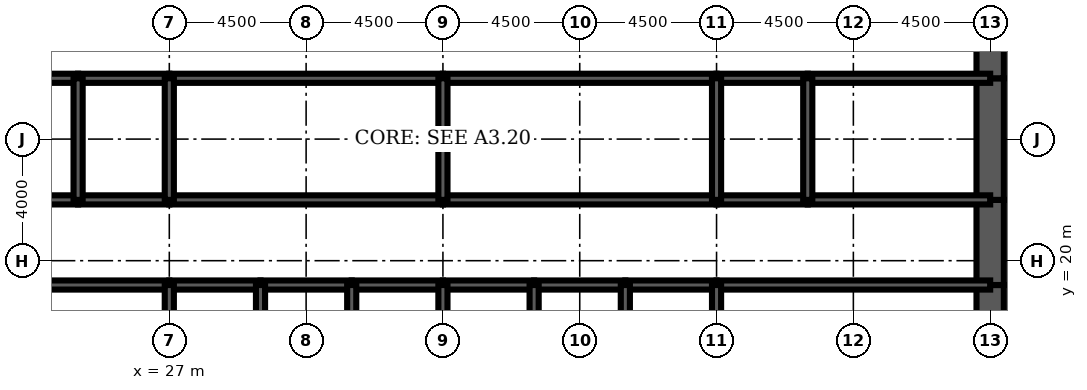
"""IFC4 building model, lengths in metres.
Left out: names, types, materials, properties, quantities, classifications, styles, units other than length and angle.
Written with IfcOpenShell. Run it as: python <this file> out.ifc"""

import sys

from ifc_helpers import new_model, si_unit, direction, frame, frame_2d, origin, place, context, subcontext, project, spatial, rectangle, extrude, element, fill, save


model = new_model("IFC4")
c1 = context("Model", 3, precision=1e-05, world=origin(), true_north=direction((0.0, 1.0)))
c2 = subcontext(c1, "Body", "Model", "MODEL_VIEW")
j1 = project(units=[si_unit("LENGTHUNIT", "METRE"), si_unit("PLANEANGLEUNIT", "RADIAN")], contexts=[c1])
p1 = place(None, origin())
s1 = spatial("IfcSite", under=j1, at=p1, CompositionType="ELEMENT")
p2 = place(p1, origin())
s2 = spatial("IfcBuilding", under=s1, at=p2, CompositionType="ELEMENT")
p3 = place(p2, frame((0.0, 0.0, 86.0)))
s3 = spatial("IfcBuildingStorey", under=s2, at=p3, CompositionType="ELEMENT", Elevation=86.0)
p4 = place(p3, frame((54.0, 16.0, 0.0), z_axis=(0.0, 0.0, 1.0), x_axis=(0.0, 1.0, 0.0)))
e1 = element("IfcWall", 1, at=p4, inside=s3, PredefinedType="SHEAR", context=c2, shape_type="SweptSolid", body=[
    extrude(rectangle(XDim=3.2, YDim=0.9, at=frame_2d((1.6, 0.0))), origin(), (0.0, 0.0, 1.0), 4.5),
])
p5 = place(p3, frame((54.0, 19.2, 0.0), z_axis=(0.0, 0.0, 1.0), x_axis=(0.0, 1.0, 0.0)))
e2 = element("IfcWall", 2, at=p5, inside=s3, PredefinedType="SHEAR", context=c2, shape_type="SweptSolid", body=[
    extrude(rectangle(XDim=2.8, YDim=0.9, at=frame_2d((1.4, 0.0))), origin(), (0.0, 0.0, 1.0), 4.5),
])
p6 = place(p5, frame((0.4, 0.0, 0.0)))
e3 = element("IfcOpeningElement", 3, at=p6, cuts=e2, PredefinedType="OPENING", context=c2, shape_type="SweptSolid", body=[
    extrude(rectangle(XDim=1.8, YDim=2.1, at=frame_2d((0.9, 1.05))), frame((0.0, 0.46, 0.0), z_axis=(0.0, -1.0, 0.0), x_axis=(1.0, 0.0, 0.0)), (0.0, 0.0, 1.0), 0.92),
])
p7 = place(p3, frame((54.0, 22.0, 0.0), z_axis=(0.0, 0.0, 1.0), x_axis=(0.0, 1.0, 0.0)))
e4 = element("IfcWall", 4, at=p7, inside=s3, PredefinedType="SHEAR", context=c2, shape_type="SweptSolid", body=[
    extrude(rectangle(XDim=4.0, YDim=0.9, at=frame_2d((2.0, 0.0))), origin(), (0.0, 0.0, 1.0), 4.5),
])
p8 = place(p3, frame((54.0, 26.0, 0.0), z_axis=(0.0, 0.0, 1.0), x_axis=(0.0, 1.0, 0.0)))
e5 = element("IfcWall", 5, at=p8, inside=s3, PredefinedType="SHEAR", context=c2, shape_type="SweptSolid", body=[
    extrude(rectangle(XDim=2.8, YDim=0.9, at=frame_2d((1.4, 0.0))), origin(), (0.0, 0.0, 1.0), 4.5),
])
p9 = place(p8, frame((0.6, 0.0, 0.0)))
e6 = element("IfcOpeningElement", 6, at=p9, cuts=e5, PredefinedType="OPENING", context=c2, shape_type="SweptSolid", body=[
    extrude(rectangle(XDim=1.8, YDim=2.1, at=frame_2d((0.9, 1.05))), frame((0.0, 0.46, 0.0), z_axis=(0.0, -1.0, 0.0), x_axis=(1.0, 0.0, 0.0)), (0.0, 0.0, 1.0), 0.92),
])
p10 = place(p3, frame((18.0, 19.2, 0.0), z_axis=(0.0, 0.0, 1.0), x_axis=(1.0, 0.0, 0.0)))
e7 = element("IfcWall", 7, at=p10, inside=s3, PredefinedType="SOLIDWALL", context=c2, shape_type="SweptSolid", body=[
    extrude(rectangle(XDim=9.0, YDim=0.3, at=frame_2d((4.5, 0.0))), origin(), (0.0, 0.0, 1.0), 4.5),
])
p11 = place(p10, frame((0.65, 0.0, 0.0)))
e8 = element("IfcOpeningElement", 8, at=p11, cuts=e7, PredefinedType="OPENING", context=c2, shape_type="SweptSolid", body=[
    extrude(rectangle(XDim=1.0, YDim=2.1, at=frame_2d((0.5, 1.05))), frame((0.0, 0.16, 0.0), z_axis=(0.0, -1.0, 0.0), x_axis=(1.0, 0.0, 0.0)), (0.0, 0.0, 1.0), 0.32),
])
p12 = place(p3, frame((27.0, 19.2, 0.0), z_axis=(0.0, 0.0, 1.0), x_axis=(1.0, 0.0, 0.0)))
e9 = element("IfcWall", 9, at=p12, inside=s3, PredefinedType="SOLIDWALL", context=c2, shape_type="SweptSolid", body=[
    extrude(rectangle(XDim=3.0, YDim=0.3, at=frame_2d((1.5, 0.0))), origin(), (0.0, 0.0, 1.0), 4.5),
])
p13 = place(p12, frame((0.95, 0.0, 0.0)))
e10 = element("IfcOpeningElement", 10, at=p13, cuts=e9, PredefinedType="OPENING", context=c2, shape_type="SweptSolid", body=[
    extrude(rectangle(XDim=1.1, YDim=2.2, at=frame_2d((0.55, 1.1))), frame((0.0, 0.16, 0.0), z_axis=(0.0, -1.0, 0.0), x_axis=(1.0, 0.0, 0.0)), (0.0, 0.0, 1.0), 0.32),
])
p14 = place(p3, frame((30.0, 19.2, 0.0), z_axis=(0.0, 0.0, 1.0), x_axis=(1.0, 0.0, 0.0)))
e11 = element("IfcWall", 11, at=p14, inside=s3, PredefinedType="SOLIDWALL", context=c2, shape_type="SweptSolid", body=[
    extrude(rectangle(XDim=3.0, YDim=0.3, at=frame_2d((1.5, 0.0))), origin(), (0.0, 0.0, 1.0), 4.5),
])
p15 = place(p14, frame((0.95, 0.0, 0.0)))
e12 = element("IfcOpeningElement", 12, at=p15, cuts=e11, PredefinedType="OPENING", context=c2, shape_type="SweptSolid", body=[
    extrude(rectangle(XDim=1.1, YDim=2.2, at=frame_2d((0.55, 1.1))), frame((0.0, 0.16, 0.0), z_axis=(0.0, -1.0, 0.0), x_axis=(1.0, 0.0, 0.0)), (0.0, 0.0, 1.0), 0.32),
])
p16 = place(p3, frame((33.0, 19.2, 0.0), z_axis=(0.0, 0.0, 1.0), x_axis=(1.0, 0.0, 0.0)))
e13 = element("IfcWall", 13, at=p16, inside=s3, PredefinedType="SOLIDWALL", context=c2, shape_type="SweptSolid", body=[
    extrude(rectangle(XDim=3.0, YDim=0.3, at=frame_2d((1.5, 0.0))), origin(), (0.0, 0.0, 1.0), 4.5),
])
p17 = place(p16, frame((0.95, 0.0, 0.0)))
e14 = element("IfcOpeningElement", 14, at=p17, cuts=e13, PredefinedType="OPENING", context=c2, shape_type="SweptSolid", body=[
    extrude(rectangle(XDim=1.1, YDim=2.2, at=frame_2d((0.55, 1.1))), frame((0.0, 0.16, 0.0), z_axis=(0.0, -1.0, 0.0), x_axis=(1.0, 0.0, 0.0)), (0.0, 0.0, 1.0), 0.32),
])
p18 = place(p3, frame((36.0, 19.2, 0.0), z_axis=(0.0, 0.0, 1.0), x_axis=(1.0, 0.0, 0.0)))
e15 = element("IfcWall", 15, at=p18, inside=s3, PredefinedType="SOLIDWALL", context=c2, shape_type="SweptSolid", body=[
    extrude(rectangle(XDim=3.0, YDim=0.3, at=frame_2d((1.5, 0.0))), origin(), (0.0, 0.0, 1.0), 4.5),
])
p19 = place(p18, frame((0.95, 0.0, 0.0)))
e16 = element("IfcOpeningElement", 16, at=p19, cuts=e15, PredefinedType="OPENING", context=c2, shape_type="SweptSolid", body=[
    extrude(rectangle(XDim=1.1, YDim=2.2, at=frame_2d((0.55, 1.1))), frame((0.0, 0.16, 0.0), z_axis=(0.0, -1.0, 0.0), x_axis=(1.0, 0.0, 0.0)), (0.0, 0.0, 1.0), 0.32),
])
for number, where, z_axis, x_axis in (
    (17, (39.0, 19.2, 0.0), (0.0, 0.0, 1.0), (1.0, 0.0, 0.0)),
    (18, (42.0, 19.2, 0.0), (0.0, 0.0, 1.0), (1.0, 0.0, 0.0)),
):
    element("IfcWall", number, at=place(p3, frame(where, z_axis=z_axis, x_axis=x_axis)), inside=s3, PredefinedType="SOLIDWALL", context=c2, shape_type="SweptSolid", body=[
        extrude(rectangle(XDim=3.0, YDim=0.3, at=frame_2d((1.5, 0.0))), origin(), (0.0, 0.0, 1.0), 4.5),
    ])
p20 = place(p3, frame((45.0, 19.2, 0.0), z_axis=(0.0, 0.0, 1.0), x_axis=(1.0, 0.0, 0.0)))
e19 = element("IfcWall", 19, at=p20, inside=s3, PredefinedType="SOLIDWALL", context=c2, shape_type="SweptSolid", body=[
    extrude(rectangle(XDim=9.0, YDim=0.3, at=frame_2d((4.5, 0.0))), origin(), (0.0, 0.0, 1.0), 4.5),
])
p21 = place(p20, frame((7.35, 0.0, 0.0)))
e20 = element("IfcOpeningElement", 20, at=p21, cuts=e19, PredefinedType="OPENING", context=c2, shape_type="SweptSolid", body=[
    extrude(rectangle(XDim=1.0, YDim=2.1, at=frame_2d((0.5, 1.05))), frame((0.0, 0.16, 0.0), z_axis=(0.0, -1.0, 0.0), x_axis=(1.0, 0.0, 0.0)), (0.0, 0.0, 1.0), 0.32),
])
p22 = place(p3, frame((18.0, 22.0, 0.0), z_axis=(0.0, 0.0, 1.0), x_axis=(1.0, 0.0, 0.0)))
e21 = element("IfcWall", 21, at=p22, inside=s3, PredefinedType="SOLIDWALL", context=c2, shape_type="SweptSolid", body=[
    extrude(rectangle(XDim=6.0, YDim=0.3, at=frame_2d((3.0, 0.0))), origin(), (0.0, 0.0, 1.0), 4.5),
])
p23 = place(p22, frame((4.4, 0.0, 0.0)))
e22 = element("IfcOpeningElement", 22, at=p23, cuts=e21, PredefinedType="OPENING", context=c2, shape_type="SweptSolid", body=[
    extrude(rectangle(XDim=1.0, YDim=2.1, at=frame_2d((0.5, 1.05))), frame((0.0, 0.16, 0.0), z_axis=(0.0, -1.0, 0.0), x_axis=(1.0, 0.0, 0.0)), (0.0, 0.0, 1.0), 0.32),
])
p24 = place(p22, frame((0.85, 0.0, 0.0)))
e23 = element("IfcOpeningElement", 23, at=p24, cuts=e21, PredefinedType="OPENING", context=c2, shape_type="SweptSolid", body=[
    extrude(rectangle(XDim=1.0, YDim=2.1, at=frame_2d((0.5, 1.05))), frame((0.0, 0.16, 0.0), z_axis=(0.0, -1.0, 0.0), x_axis=(1.0, 0.0, 0.0)), (0.0, 0.0, 1.0), 0.32),
])
p25 = place(p3, frame((24.0, 22.0, 0.0), z_axis=(0.0, 0.0, 1.0), x_axis=(1.0, 0.0, 0.0)))
e24 = element("IfcWall", 24, at=p25, inside=s3, PredefinedType="SOLIDWALL", context=c2, shape_type="SweptSolid", body=[
    extrude(rectangle(XDim=3.0, YDim=0.3, at=frame_2d((1.5, 0.0))), origin(), (0.0, 0.0, 1.0), 4.5),
])
p26 = place(p25, frame((1.0, 0.0, 0.0)))
e25 = element("IfcOpeningElement", 25, at=p26, cuts=e24, PredefinedType="OPENING", context=c2, shape_type="SweptSolid", body=[
    extrude(rectangle(XDim=1.0, YDim=2.1, at=frame_2d((0.5, 1.05))), frame((0.0, 0.16, 0.0), z_axis=(0.0, -1.0, 0.0), x_axis=(1.0, 0.0, 0.0)), (0.0, 0.0, 1.0), 0.32),
])
p27 = place(p3, frame((27.0, 22.0, 0.0), z_axis=(0.0, 0.0, 1.0), x_axis=(1.0, 0.0, 0.0)))
e26 = element("IfcWall", 26, at=p27, inside=s3, PredefinedType="SOLIDWALL", context=c2, shape_type="SweptSolid", body=[
    extrude(rectangle(XDim=9.0, YDim=0.3, at=frame_2d((4.5, 0.0))), origin(), (0.0, 0.0, 1.0), 4.5),
])
p28 = place(p27, frame((4.0, 0.0, 0.0)))
e27 = element("IfcOpeningElement", 27, at=p28, cuts=e26, PredefinedType="OPENING", context=c2, shape_type="SweptSolid", body=[
    extrude(rectangle(XDim=1.0, YDim=2.1, at=frame_2d((0.5, 1.05))), frame((0.0, 0.16, 0.0), z_axis=(0.0, -1.0, 0.0), x_axis=(1.0, 0.0, 0.0)), (0.0, 0.0, 1.0), 0.32),
])
p29 = place(p3, frame((36.0, 22.0, 0.0), z_axis=(0.0, 0.0, 1.0), x_axis=(1.0, 0.0, 0.0)))
e28 = element("IfcWall", 28, at=p29, inside=s3, PredefinedType="SOLIDWALL", context=c2, shape_type="SweptSolid", body=[
    extrude(rectangle(XDim=9.0, YDim=0.3, at=frame_2d((4.5, 0.0))), origin(), (0.0, 0.0, 1.0), 4.5),
])
p30 = place(p29, frame((4.0, 0.0, 0.0)))
e29 = element("IfcOpeningElement", 29, at=p30, cuts=e28, PredefinedType="OPENING", context=c2, shape_type="SweptSolid", body=[
    extrude(rectangle(XDim=1.0, YDim=2.1, at=frame_2d((0.5, 1.05))), frame((0.0, 0.16, 0.0), z_axis=(0.0, -1.0, 0.0), x_axis=(1.0, 0.0, 0.0)), (0.0, 0.0, 1.0), 0.32),
])
p31 = place(p3, frame((45.0, 22.0, 0.0), z_axis=(0.0, 0.0, 1.0), x_axis=(1.0, 0.0, 0.0)))
e30 = element("IfcWall", 30, at=p31, inside=s3, PredefinedType="SOLIDWALL", context=c2, shape_type="SweptSolid", body=[
    extrude(rectangle(XDim=3.0, YDim=0.3, at=frame_2d((1.5, 0.0))), origin(), (0.0, 0.0, 1.0), 4.5),
])
p32 = place(p31, frame((1.0, 0.0, 0.0)))
e31 = element("IfcOpeningElement", 31, at=p32, cuts=e30, PredefinedType="OPENING", context=c2, shape_type="SweptSolid", body=[
    extrude(rectangle(XDim=1.0, YDim=2.1, at=frame_2d((0.5, 1.05))), frame((0.0, 0.16, 0.0), z_axis=(0.0, -1.0, 0.0), x_axis=(1.0, 0.0, 0.0)), (0.0, 0.0, 1.0), 0.32),
])
p33 = place(p3, frame((48.0, 22.0, 0.0), z_axis=(0.0, 0.0, 1.0), x_axis=(1.0, 0.0, 0.0)))
e32 = element("IfcWall", 32, at=p33, inside=s3, PredefinedType="SOLIDWALL", context=c2, shape_type="SweptSolid", body=[
    extrude(rectangle(XDim=6.0, YDim=0.3, at=frame_2d((3.0, 0.0))), origin(), (0.0, 0.0, 1.0), 4.5),
])
p34 = place(p33, frame((2.0, 0.0, 0.0)))
e33 = element("IfcOpeningElement", 33, at=p34, cuts=e32, PredefinedType="OPENING", context=c2, shape_type="SweptSolid", body=[
    extrude(rectangle(XDim=1.0, YDim=2.1, at=frame_2d((0.5, 1.05))), frame((0.0, 0.16, 0.0), z_axis=(0.0, -1.0, 0.0), x_axis=(1.0, 0.0, 0.0)), (0.0, 0.0, 1.0), 0.32),
])
p35 = place(p33, frame((4.0, 0.0, 0.0)))
e34 = element("IfcOpeningElement", 34, at=p35, cuts=e32, PredefinedType="OPENING", context=c2, shape_type="SweptSolid", body=[
    extrude(rectangle(XDim=1.0, YDim=2.1, at=frame_2d((0.5, 1.05))), frame((0.0, 0.16, 0.0), z_axis=(0.0, -1.0, 0.0), x_axis=(1.0, 0.0, 0.0)), (0.0, 0.0, 1.0), 0.32),
])
p36 = place(p3, frame((18.0, 26.0, 0.0), z_axis=(0.0, 0.0, 1.0), x_axis=(1.0, 0.0, 0.0)))
e35 = element("IfcWall", 35, at=p36, inside=s3, PredefinedType="SOLIDWALL", context=c2, shape_type="SweptSolid", body=[
    extrude(rectangle(XDim=6.0, YDim=0.3, at=frame_2d((3.0, 0.0))), origin(), (0.0, 0.0, 1.0), 4.5),
])
p37 = place(p3, frame((24.0, 26.0, 0.0), z_axis=(0.0, 0.0, 1.0), x_axis=(1.0, 0.0, 0.0)))
e36 = element("IfcWall", 36, at=p37, inside=s3, PredefinedType="SOLIDWALL", context=c2, shape_type="SweptSolid", body=[
    extrude(rectangle(XDim=3.0, YDim=0.3, at=frame_2d((1.5, 0.0))), origin(), (0.0, 0.0, 1.0), 4.5),
])
for number, where, z_axis, x_axis in (
    (37, (27.0, 26.0, 0.0), (0.0, 0.0, 1.0), (1.0, 0.0, 0.0)),
    (38, (36.0, 26.0, 0.0), (0.0, 0.0, 1.0), (1.0, 0.0, 0.0)),
):
    element("IfcWall", number, at=place(p3, frame(where, z_axis=z_axis, x_axis=x_axis)), inside=s3, PredefinedType="SOLIDWALL", context=c2, shape_type="SweptSolid", body=[
        extrude(rectangle(XDim=9.0, YDim=0.3, at=frame_2d((4.5, 0.0))), origin(), (0.0, 0.0, 1.0), 4.5),
    ])
p38 = place(p3, frame((45.0, 26.0, 0.0), z_axis=(0.0, 0.0, 1.0), x_axis=(1.0, 0.0, 0.0)))
e39 = element("IfcWall", 39, at=p38, inside=s3, PredefinedType="SOLIDWALL", context=c2, shape_type="SweptSolid", body=[
    extrude(rectangle(XDim=3.0, YDim=0.3, at=frame_2d((1.5, 0.0))), origin(), (0.0, 0.0, 1.0), 4.5),
])
p39 = place(p3, frame((48.0, 26.0, 0.0), z_axis=(0.0, 0.0, 1.0), x_axis=(1.0, 0.0, 0.0)))
e40 = element("IfcWall", 40, at=p39, inside=s3, PredefinedType="SOLIDWALL", context=c2, shape_type="SweptSolid", body=[
    extrude(rectangle(XDim=6.0, YDim=0.3, at=frame_2d((3.0, 0.0))), origin(), (0.0, 0.0, 1.0), 4.5),
])
for number, where, z_axis, x_axis in (
    (41, (27.0, 16.0, 0.0), (0.0, 0.0, 1.0), (0.0, 1.0, 0.0)),
    (42, (30.0, 16.0, 0.0), (0.0, 0.0, 1.0), (0.0, 1.0, 0.0)),
    (43, (33.0, 16.0, 0.0), (0.0, 0.0, 1.0), (0.0, 1.0, 0.0)),
    (44, (36.0, 16.0, 0.0), (0.0, 0.0, 1.0), (0.0, 1.0, 0.0)),
    (45, (39.0, 16.0, 0.0), (0.0, 0.0, 1.0), (0.0, 1.0, 0.0)),
    (46, (42.0, 16.0, 0.0), (0.0, 0.0, 1.0), (0.0, 1.0, 0.0)),
    (47, (45.0, 16.0, 0.0), (0.0, 0.0, 1.0), (0.0, 1.0, 0.0)),
):
    element("IfcWall", number, at=place(p3, frame(where, z_axis=z_axis, x_axis=x_axis)), inside=s3, PredefinedType="SOLIDWALL", context=c2, shape_type="SweptSolid", body=[
        extrude(rectangle(XDim=3.2, YDim=0.3, at=frame_2d((1.6, 0.0))), origin(), (0.0, 0.0, 1.0), 4.5),
    ])
for number, where, z_axis, x_axis in (
    (48, (24.0, 22.0, 0.0), (0.0, 0.0, 1.0), (0.0, 1.0, 0.0)),
    (49, (27.0, 22.0, 0.0), (0.0, 0.0, 1.0), (0.0, 1.0, 0.0)),
    (50, (36.0, 22.0, 0.0), (0.0, 0.0, 1.0), (0.0, 1.0, 0.0)),
    (51, (45.0, 22.0, 0.0), (0.0, 0.0, 1.0), (0.0, 1.0, 0.0)),
    (52, (48.0, 22.0, 0.0), (0.0, 0.0, 1.0), (0.0, 1.0, 0.0)),
):
    element("IfcWall", number, at=place(p3, frame(where, z_axis=z_axis, x_axis=x_axis)), inside=s3, PredefinedType="SOLIDWALL", context=c2, shape_type="SweptSolid", body=[
        extrude(rectangle(XDim=4.0, YDim=0.3, at=frame_2d((2.0, 0.0))), origin(), (0.0, 0.0, 1.0), 4.5),
    ])
p40 = place(p3, frame((39.0, 22.15, 0.0), z_axis=(0.0, 0.0, 1.0), x_axis=(0.0, 1.0, 0.0)))
e53 = element("IfcWall", 53, at=p40, inside=s3, PredefinedType="PARTITIONING", context=c2, shape_type="SweptSolid", body=[
    extrude(rectangle(XDim=3.7, YDim=0.15, at=frame_2d((1.85, 0.0))), origin(), (0.0, 0.0, 1.0), 3.0),
])
p41 = place(p40, frame((2.2, 0.0, 0.0)))
e54 = element("IfcOpeningElement", 54, at=p41, cuts=e53, PredefinedType="OPENING", context=c2, shape_type="SweptSolid", body=[
    extrude(rectangle(XDim=1.0, YDim=2.1, at=frame_2d((0.5, 1.05))), frame((0.0, 0.085, 0.0), z_axis=(0.0, -1.0, 0.0), x_axis=(1.0, 0.0, 0.0)), (0.0, 0.0, 1.0), 0.17),
])
p42 = place(p3, frame((51.375, 22.15, 0.0), z_axis=(0.0, 0.0, 1.0), x_axis=(0.0, 1.0, 0.0)))
e55 = element("IfcWall", 55, at=p42, inside=s3, PredefinedType="PARTITIONING", context=c2, shape_type="SweptSolid", body=[
    extrude(rectangle(XDim=3.7, YDim=0.15, at=frame_2d((1.85, 0.0))), origin(), (0.0, 0.0, 1.0), 3.0),
])
p43 = place(p3, frame((48.6, 19.35, 0.0), z_axis=(0.0, 0.0, 1.0), x_axis=(0.0, 1.0, 0.0)))
e56 = element("IfcWall", 56, at=p43, inside=s3, PredefinedType="PARTITIONING", context=c2, shape_type="SweptSolid", body=[
    extrude(rectangle(XDim=2.5, YDim=0.15, at=frame_2d((1.25, 0.0))), origin(), (0.0, 0.0, 1.0), 3.0),
])
p44 = place(p43, frame((1.15, 0.0, 0.0)))
e57 = element("IfcOpeningElement", 57, at=p44, cuts=e56, PredefinedType="OPENING", context=c2, shape_type="SweptSolid", body=[
    extrude(rectangle(XDim=1.0, YDim=2.1, at=frame_2d((0.5, 1.05))), frame((0.0, 0.085, 0.0), z_axis=(0.0, -1.0, 0.0), x_axis=(1.0, 0.0, 0.0)), (0.0, 0.0, 1.0), 0.17),
])
p45 = place(p41, origin())
e58 = element("IfcDoor", 58, at=p45, inside=s3, OperationType="SINGLE_SWING_RIGHT", PredefinedType="DOOR", context=c2, shape_type="SweptSolid", body=[
    extrude(rectangle(XDim=1.0, YDim=2.1, at=frame_2d((0.5, 1.05))), frame((0.0, 0.025, 0.0), z_axis=(0.0, -1.0, 0.0), x_axis=(1.0, 0.0, 0.0)), (0.0, 0.0, 1.0), 0.05),
])
fill(e54, e58)
p46 = place(p44, origin())
e59 = element("IfcDoor", 59, at=p46, inside=s3, OperationType="SINGLE_SWING_RIGHT", PredefinedType="DOOR", context=c2, shape_type="SweptSolid", body=[
    extrude(rectangle(XDim=1.0, YDim=2.1, at=frame_2d((0.5, 1.05))), frame((0.0, 0.025, 0.0), z_axis=(0.0, -1.0, 0.0), x_axis=(1.0, 0.0, 0.0)), (0.0, 0.0, 1.0), 0.05),
])
fill(e57, e59)
p47 = place(p13, origin())
e60 = element("IfcDoor", 60, at=p47, inside=s3, OperationType="DOUBLE_DOOR_SLIDING", PredefinedType="USERDEFINED", context=c2, shape_type="SweptSolid", body=[
    extrude(rectangle(XDim=1.1, YDim=2.2, at=frame_2d((0.55, 1.1))), frame((0.0, 0.025, 0.0), z_axis=(0.0, -1.0, 0.0), x_axis=(1.0, 0.0, 0.0)), (0.0, 0.0, 1.0), 0.05),
])
fill(e10, e60)
p48 = place(p15, origin())
e61 = element("IfcDoor", 61, at=p48, inside=s3, OperationType="DOUBLE_DOOR_SLIDING", PredefinedType="USERDEFINED", context=c2, shape_type="SweptSolid", body=[
    extrude(rectangle(XDim=1.1, YDim=2.2, at=frame_2d((0.55, 1.1))), frame((0.0, 0.025, 0.0), z_axis=(0.0, -1.0, 0.0), x_axis=(1.0, 0.0, 0.0)), (0.0, 0.0, 1.0), 0.05),
])
fill(e12, e61)
p49 = place(p17, origin())
e62 = element("IfcDoor", 62, at=p49, inside=s3, OperationType="DOUBLE_DOOR_SLIDING", PredefinedType="USERDEFINED", context=c2, shape_type="SweptSolid", body=[
    extrude(rectangle(XDim=1.1, YDim=2.2, at=frame_2d((0.55, 1.1))), frame((0.0, 0.025, 0.0), z_axis=(0.0, -1.0, 0.0), x_axis=(1.0, 0.0, 0.0)), (0.0, 0.0, 1.0), 0.05),
])
fill(e14, e62)
p50 = place(p19, origin())
e63 = element("IfcDoor", 63, at=p50, inside=s3, OperationType="DOUBLE_DOOR_SLIDING", PredefinedType="USERDEFINED", context=c2, shape_type="SweptSolid", body=[
    extrude(rectangle(XDim=1.1, YDim=2.2, at=frame_2d((0.55, 1.1))), frame((0.0, 0.025, 0.0), z_axis=(0.0, -1.0, 0.0), x_axis=(1.0, 0.0, 0.0)), (0.0, 0.0, 1.0), 0.05),
])
fill(e16, e63)
p51 = place(p21, origin())
e64 = element("IfcDoor", 64, at=p51, inside=s3, OperationType="SINGLE_SWING_RIGHT", PredefinedType="DOOR", context=c2, shape_type="SweptSolid", body=[
    extrude(rectangle(XDim=1.0, YDim=2.1, at=frame_2d((0.5, 1.05))), frame((0.0, 0.025, 0.0), z_axis=(0.0, -1.0, 0.0), x_axis=(1.0, 0.0, 0.0)), (0.0, 0.0, 1.0), 0.05),
])
fill(e20, e64)
p52 = place(p6, origin())
e65 = element("IfcDoor", 65, at=p52, inside=s3, OperationType="SINGLE_SWING_LEFT", PredefinedType="DOOR", context=c2, shape_type="SweptSolid", body=[
    extrude(rectangle(XDim=1.8, YDim=2.1, at=frame_2d((0.9, 1.05))), frame((0.0, 0.45, 0.0), z_axis=(0.0, -1.0, 0.0), x_axis=(1.0, 0.0, 0.0)), (0.0, 0.0, 1.0), 0.899),
])
fill(e3, e65)
p53 = place(p9, origin())
e66 = element("IfcDoor", 66, at=p53, inside=s3, OperationType="SINGLE_SWING_LEFT", PredefinedType="DOOR", context=c2, shape_type="SweptSolid", body=[
    extrude(rectangle(XDim=1.8, YDim=2.1, at=frame_2d((0.9, 1.05))), frame((0.0, 0.45, 0.0), z_axis=(0.0, -1.0, 0.0), x_axis=(1.0, 0.0, 0.0)), (0.0, 0.0, 1.0), 0.899),
])
fill(e6, e66)
p54 = place(p23, origin())
e67 = element("IfcDoor", 67, at=p54, inside=s3, OperationType="SINGLE_SWING_RIGHT", PredefinedType="DOOR", context=c2, shape_type="SweptSolid", body=[
    extrude(rectangle(XDim=1.0, YDim=2.1, at=frame_2d((0.5, 1.05))), frame((0.0, 0.025, 0.0), z_axis=(0.0, -1.0, 0.0), x_axis=(1.0, 0.0, 0.0)), (0.0, 0.0, 1.0), 0.05),
])
fill(e22, e67)
p55 = place(p26, origin())
e68 = element("IfcDoor", 68, at=p55, inside=s3, OperationType="SINGLE_SWING_LEFT", PredefinedType="DOOR", context=c2, shape_type="SweptSolid", body=[
    extrude(rectangle(XDim=1.0, YDim=2.1, at=frame_2d((0.5, 1.05))), frame((0.0, 0.025, 0.0), z_axis=(0.0, -1.0, 0.0), x_axis=(1.0, 0.0, 0.0)), (0.0, 0.0, 1.0), 0.05),
])
fill(e25, e68)
p56 = place(p28, origin())
e69 = element("IfcDoor", 69, at=p56, inside=s3, OperationType="SINGLE_SWING_LEFT", PredefinedType="DOOR", context=c2, shape_type="SweptSolid", body=[
    extrude(rectangle(XDim=1.0, YDim=2.1, at=frame_2d((0.5, 1.05))), frame((0.0, 0.025, 0.0), z_axis=(0.0, -1.0, 0.0), x_axis=(1.0, 0.0, 0.0)), (0.0, 0.0, 1.0), 0.05),
])
fill(e27, e69)
p57 = place(p30, origin())
e70 = element("IfcDoor", 70, at=p57, inside=s3, OperationType="SINGLE_SWING_LEFT", PredefinedType="DOOR", context=c2, shape_type="SweptSolid", body=[
    extrude(rectangle(XDim=1.0, YDim=2.1, at=frame_2d((0.5, 1.05))), frame((0.0, 0.025, 0.0), z_axis=(0.0, -1.0, 0.0), x_axis=(1.0, 0.0, 0.0)), (0.0, 0.0, 1.0), 0.05),
])
fill(e29, e70)
p58 = place(p32, origin())
e71 = element("IfcDoor", 71, at=p58, inside=s3, OperationType="SINGLE_SWING_LEFT", PredefinedType="DOOR", context=c2, shape_type="SweptSolid", body=[
    extrude(rectangle(XDim=1.0, YDim=2.1, at=frame_2d((0.5, 1.05))), frame((0.0, 0.025, 0.0), z_axis=(0.0, -1.0, 0.0), x_axis=(1.0, 0.0, 0.0)), (0.0, 0.0, 1.0), 0.05),
])
fill(e31, e71)
p59 = place(p34, origin())
e72 = element("IfcDoor", 72, at=p59, inside=s3, OperationType="SINGLE_SWING_LEFT", PredefinedType="DOOR", context=c2, shape_type="SweptSolid", body=[
    extrude(rectangle(XDim=1.0, YDim=2.1, at=frame_2d((0.5, 1.05))), frame((0.0, 0.025, 0.0), z_axis=(0.0, -1.0, 0.0), x_axis=(1.0, 0.0, 0.0)), (0.0, 0.0, 1.0), 0.05),
])
fill(e33, e72)
p60 = place(p35, origin())
e73 = element("IfcDoor", 73, at=p60, inside=s3, OperationType="SINGLE_SWING_RIGHT", PredefinedType="DOOR", context=c2, shape_type="SweptSolid", body=[
    extrude(rectangle(XDim=1.0, YDim=2.1, at=frame_2d((0.5, 1.05))), frame((0.0, 0.025, 0.0), z_axis=(0.0, -1.0, 0.0), x_axis=(1.0, 0.0, 0.0)), (0.0, 0.0, 1.0), 0.05),
])
fill(e34, e73)
save(model, sys.argv[1])
